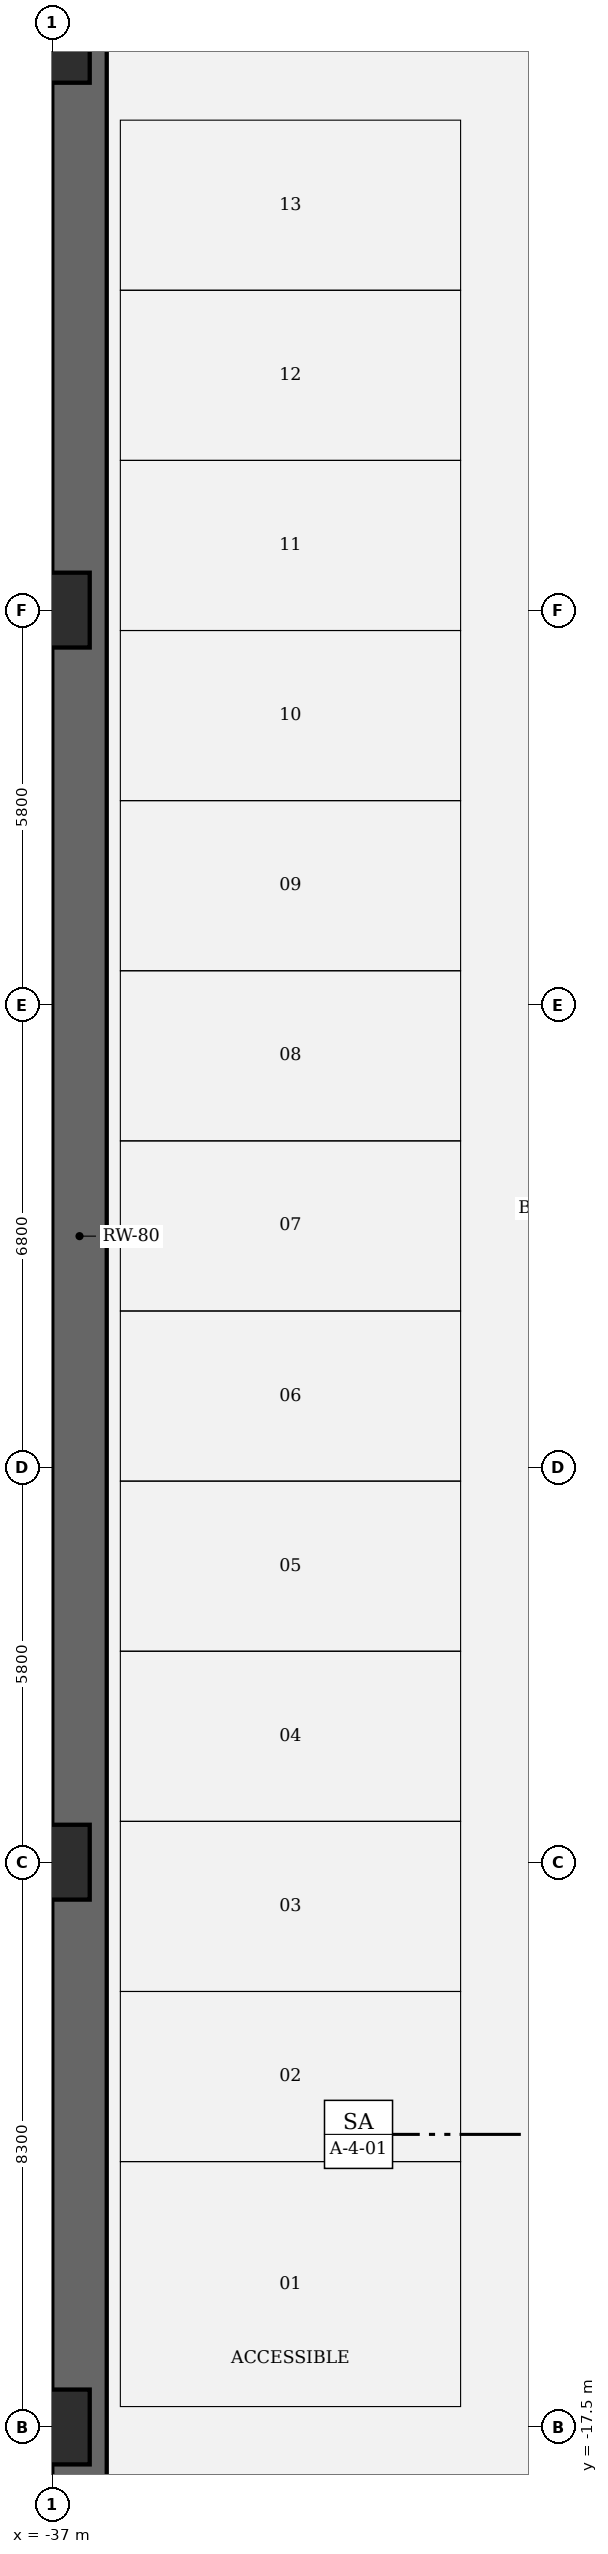
"""IFC4 building model, lengths in metres.
Left out: names, types, materials, properties, quantities, classifications, styles, units other than length and angle.
Written with IfcOpenShell. Run it as: python <this file> out.ifc"""

import sys

from ifc_helpers import new_model, si_unit, direction, frame, frame_2d, origin, origin_2d, place, context, subcontext, project, spatial, rectangle, extrude, element, save


model = new_model("IFC4")
c1 = context("Model", 3, precision=1e-05, world=origin(), true_north=direction((0.0, 1.0)))
c2 = subcontext(c1, "Body", "Model", "MODEL_VIEW")
j1 = project(units=[si_unit("LENGTHUNIT", "METRE"), si_unit("PLANEANGLEUNIT", "RADIAN")], contexts=[c1])
p1 = place(None, origin())
s1 = spatial("IfcSite", under=j1, at=p1, CompositionType="ELEMENT")
p2 = place(p1, origin())
s2 = spatial("IfcBuilding", under=s1, at=p2, CompositionType="ELEMENT")
p3 = place(p2, frame((0.0, 0.0, -9.6)))
s3 = spatial("IfcBuildingStorey", under=s2, at=p3, CompositionType="ELEMENT", Elevation=-9.6)
for number, where, z_axis, x_axis in (
    (1, (-37.0, -17.5, 0.0), (0.0, 0.0, 1.0), (1.0, 0.0, 0.0)),
    (2, (-37.0, -9.2, 0.0), (0.0, 0.0, 1.0), (1.0, 0.0, 0.0)),
    (3, (-37.0, 9.2, 0.0), (0.0, 0.0, 1.0), (1.0, 0.0, 0.0)),
    (4, (-37.0, 17.5, 0.0), (0.0, 0.0, 1.0), (1.0, 0.0, 0.0)),
):
    element("IfcColumn", number, at=place(p3, frame(where, z_axis=z_axis, x_axis=x_axis)), inside=s3, PredefinedType="COLUMN", context=c2, shape_type="SweptSolid", body=[
        extrude(rectangle(XDim=1.1, YDim=1.1, at=origin_2d()), origin(), (0.0, 0.0, 1.0), 4.8),
    ])
p4 = place(p3, frame((-36.6, -24.2, 0.0), z_axis=(0.0, 0.0, 1.0), x_axis=(0.0, 1.0, 0.0)))
e5 = element("IfcWall", 5, at=p4, inside=s3, PredefinedType="USERDEFINED", context=c2, shape_type="SweptSolid", body=[
    extrude(rectangle(XDim=48.4, YDim=0.8, at=frame_2d((24.2, 0.0))), origin(), (0.0, 0.0, 1.0), 4.8),
])
save(model, sys.argv[1])
